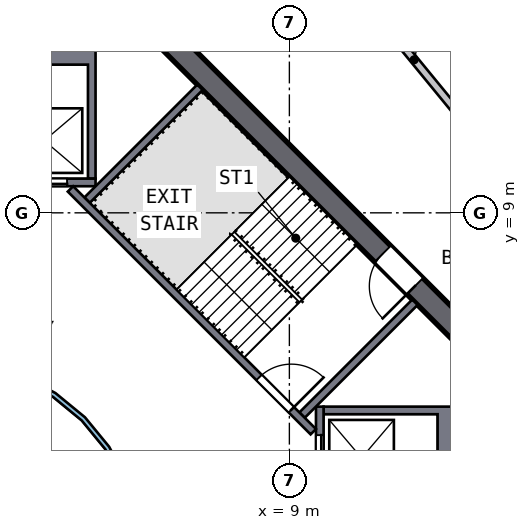
"""IFC4 building model, lengths in metres.
Left out: names, types, materials, properties, quantities, classifications, styles, units other than length and angle.
Written with IfcOpenShell. Run it as: python <this file> out.ifc"""

import sys

from ifc_helpers import new_model, si_unit, direction, frame, frame_2d, origin, place, context, subcontext, project, spatial, polyline, rectangle, outline, extrude, element, fill, save


model = new_model("IFC4")
c1 = context("Model", 3, precision=1e-05, world=origin(), true_north=direction((0.0, 1.0)))
c2 = subcontext(c1, "Body", "Model", "MODEL_VIEW")
j1 = project(units=[si_unit("LENGTHUNIT", "METRE"), si_unit("PLANEANGLEUNIT", "RADIAN")], contexts=[c1])
p1 = place(None, origin())
s1 = spatial("IfcSite", under=j1, at=p1, CompositionType="ELEMENT")
p2 = place(p1, origin())
s2 = spatial("IfcBuilding", under=s1, at=p2, CompositionType="ELEMENT")
p3 = place(p2, frame((0.0, 0.0, 194.0)))
s3 = spatial("IfcBuildingStorey", under=s2, at=p3, CompositionType="ELEMENT", Elevation=194.0)
p4 = place(p3, frame((13.788, 5.587, 0.0), z_axis=(0.0, 0.0, 1.0), x_axis=(-0.707106781, 0.707106781, 0.0)))
e1 = element("IfcWall", 1, at=p4, inside=s3, PredefinedType="SHEAR", context=c2, shape_type="SweptSolid", body=[
    extrude(rectangle(XDim=11.598, YDim=0.6, at=frame_2d((5.799, 0.0))), origin(), (0.0, 0.0, 1.0), 3.5),
])
p5 = place(p4, frame((2.099, 0.0, 0.0)))
e2 = element("IfcOpeningElement", 2, at=p5, cuts=e1, PredefinedType="OPENING", context=c2, shape_type="SweptSolid", body=[
    extrude(rectangle(XDim=1.2, YDim=2.1, at=frame_2d((0.6, 1.05))), frame((0.0, 0.31, 0.0), z_axis=(0.0, -1.0, 0.0), x_axis=(1.0, 0.0, 0.0)), (0.0, 0.0, 1.0), 0.62),
])
p6 = place(p3, origin())
e3 = element("IfcWall", 3, at=p6, inside=s3, PredefinedType="SOLIDWALL", context=c2, shape_type="SweptSolid", body=[
    extrude(outline(polyline([(13.4, 3.9), (13.4, 1.2), (9.9, 1.2), (9.9, 1.4), (12.9, 1.4), (12.9, 3.7), (9.9, 3.7), (9.9, 3.9), (13.4, 3.9)])), origin(), (0.0, 0.0, 1.0), 3.19),
])
p7 = place(p3, frame((9.8, 1.2, 0.0), z_axis=(0.0, 0.0, 1.0), x_axis=(0.0, 1.0, 0.0)))
e4 = element("IfcWall", 4, at=p7, inside=s3, PredefinedType="SOLIDWALL", context=c2, shape_type="SweptSolid", body=[
    extrude(rectangle(XDim=2.7, YDim=0.2, at=frame_2d((1.35, 0.0))), origin(), (0.0, 0.0, 1.0), 3.19),
])
p8 = place(p7, frame((0.75, 0.0, 0.0)))
e5 = element("IfcOpeningElement", 5, at=p8, cuts=e4, PredefinedType="OPENING", context=c2, shape_type="SweptSolid", body=[
    extrude(rectangle(XDim=1.2, YDim=2.1, at=frame_2d((0.6, 1.05))), frame((0.0, 0.11, 0.0), z_axis=(0.0, -1.0, 0.0), x_axis=(1.0, 0.0, 0.0)), (0.0, 0.0, 1.0), 0.22),
])
p9 = place(p3, origin())
e6 = element("IfcWall", 6, at=p9, inside=s3, PredefinedType="SOLIDWALL", context=c2, shape_type="SweptSolid", body=[
    extrude(outline(polyline([(3.9, 9.9), (3.7, 9.9), (3.7, 12.9), (1.4, 12.9), (1.4, 9.9), (1.2, 9.9), (1.2, 13.4), (3.9, 13.4), (3.9, 9.9)])), origin(), (0.0, 0.0, 1.0), 3.19),
])
p10 = place(p3, frame((1.2, 9.8, 0.0), z_axis=(0.0, 0.0, 1.0), x_axis=(1.0, 0.0, 0.0)))
e7 = element("IfcWall", 7, at=p10, inside=s3, PredefinedType="SOLIDWALL", context=c2, shape_type="SweptSolid", body=[
    extrude(rectangle(XDim=2.7, YDim=0.2, at=frame_2d((1.35, 0.0))), origin(), (0.0, 0.0, 1.0), 3.19),
])
p11 = place(p10, frame((0.75, 0.0, 0.0)))
e8 = element("IfcOpeningElement", 8, at=p11, cuts=e7, PredefinedType="OPENING", context=c2, shape_type="SweptSolid", body=[
    extrude(rectangle(XDim=1.2, YDim=2.1, at=frame_2d((0.6, 1.05))), frame((0.0, 0.11, 0.0), z_axis=(0.0, -1.0, 0.0), x_axis=(1.0, 0.0, 0.0)), (0.0, 0.0, 1.0), 0.22),
])
p12 = place(p3, frame((3.24, 9.629, 0.0), z_axis=(0.0, 0.0, 1.0), x_axis=(0.707106781, -0.707106781, 0.0)))
e9 = element("IfcWall", 9, at=p12, inside=s3, PredefinedType="SOLIDWALL", context=c2, shape_type="SweptSolid", body=[
    extrude(rectangle(XDim=9.036, YDim=0.2, at=frame_2d((4.518, 0.0))), origin(), (0.0, 0.0, 1.0), 3.19),
])
p13 = place(p12, frame((7.018, 0.0, 0.0)))
e10 = element("IfcOpeningElement", 10, at=p13, cuts=e9, PredefinedType="OPENING", context=c2, shape_type="SweptSolid", body=[
    extrude(rectangle(XDim=1.2, YDim=2.1, at=frame_2d((0.6, 1.05))), frame((0.0, 0.11, 0.0), z_axis=(0.0, -1.0, 0.0), x_axis=(1.0, 0.0, 0.0)), (0.0, 0.0, 1.0), 0.22),
])
for number, where, z_axis, x_axis in (
    (11, (9.334, 3.677, 0.0), (0.0, 0.0, 1.0), (0.707, 0.707, 0.0)),
    (12, (3.677, 9.334, 0.0), (0.0, 0.0, 1.0), (0.707, 0.707, 0.0)),
):
    element("IfcWall", number, at=place(p3, frame(where, z_axis=z_axis, x_axis=x_axis)), inside=s3, PredefinedType="SOLIDWALL", context=c2, shape_type="SweptSolid", body=[
        extrude(rectangle(XDim=4.2, YDim=0.2, at=frame_2d((2.1, 0.0))), origin(), (0.0, 0.0, 1.0), 3.19),
    ])
p14 = place(p3, origin())
e13 = element("IfcWall", 13, at=p14, inside=s3, PredefinedType="SOLIDWALL", context=c2, shape_type="SweptSolid", body=[
    extrude(outline(polyline([(5.021, -0.999), (4.73, -1.959), (4.257, -2.844), (3.62, -3.62), (2.844, -4.257), (1.959, -4.73), (0.999, -5.021), (0.0, -5.12), (-0.999, -5.021), (-1.959, -4.73), (-2.844, -4.257), (-3.62, -3.62), (-4.257, -2.844), (-4.73, -1.959), (-5.021, -0.999), (-5.12, 0.0), (-5.021, 0.999), (-4.73, 1.959), (-4.257, 2.844), (-3.62, 3.62), (-2.844, 4.257), (-1.959, 4.73), (-0.999, 5.021), (0.0, 5.12), (0.999, 5.021), (1.959, 4.73), (2.844, 4.257), (3.62, 3.62), (4.257, 2.844), (4.73, 1.959), (5.021, 0.999), (5.12, 0.0), (5.021, -0.999)]), holes=[polyline([(4.904, 0.976), (4.619, 1.913), (4.157, 2.778), (3.535, 3.535), (2.778, 4.157), (1.913, 4.619), (0.976, 4.904), (0.0, 5.0), (-0.976, 4.904), (-1.913, 4.619), (-2.778, 4.157), (-3.535, 3.535), (-4.157, 2.778), (-4.619, 1.913), (-4.904, 0.976), (-5.0, 0.0), (-4.904, -0.976), (-4.619, -1.913), (-4.157, -2.778), (-3.535, -3.535), (-2.778, -4.157), (-1.913, -4.619), (-0.976, -4.904), (0.0, -5.0), (0.976, -4.904), (1.913, -4.619), (2.778, -4.157), (3.535, -3.535), (4.157, -2.778), (4.619, -1.913), (4.904, -0.976), (5.0, 0.0), (4.904, 0.976)])]), origin(), (0.0, 0.0, 1.0), 3.19),
])
p15 = place(p3, frame((10.713, 14.941, 0.0), z_axis=(0.0, 0.0, 1.0), x_axis=(0.634184883, -0.773181437, 0.0)))
e14 = element("IfcWall", 14, at=p15, inside=s3, PredefinedType="SOLIDWALL", context=c2, shape_type="SweptSolid", body=[
    extrude(rectangle(XDim=9.316, YDim=0.2, at=frame_2d((4.658, 0.0))), origin(), (0.0, 0.0, 1.0), 3.19),
])
p16 = place(p15, frame((5.15, 0.0, 0.0)))
e15 = element("IfcOpeningElement", 15, at=p16, cuts=e14, PredefinedType="OPENING", context=c2, shape_type="SweptSolid", body=[
    extrude(rectangle(XDim=1.0, YDim=2.1, at=frame_2d((0.5, 1.05))), frame((0.0, 0.11, 0.0), z_axis=(0.0, -1.0, 0.0), x_axis=(1.0, 0.0, 0.0)), (0.0, 0.0, 1.0), 0.22),
])
p17 = place(p8, origin())
e16 = element("IfcDoor", 16, at=p17, inside=s3, OperationType="DOUBLE_DOOR_SLIDING", PredefinedType="DOOR", context=c2, shape_type="SweptSolid", body=[
    extrude(rectangle(XDim=1.2, YDim=2.1, at=frame_2d((0.6, 1.05))), frame((0.0, 0.025, 0.0), z_axis=(0.0, -1.0, 0.0), x_axis=(1.0, 0.0, 0.0)), (0.0, 0.0, 1.0), 0.05),
])
fill(e5, e16)
p18 = place(p11, origin())
e17 = element("IfcDoor", 17, at=p18, inside=s3, OperationType="DOUBLE_DOOR_SLIDING", PredefinedType="DOOR", context=c2, shape_type="SweptSolid", body=[
    extrude(rectangle(XDim=1.2, YDim=2.1, at=frame_2d((0.6, 1.05))), frame((0.0, 0.025, 0.0), z_axis=(0.0, -1.0, 0.0), x_axis=(1.0, 0.0, 0.0)), (0.0, 0.0, 1.0), 0.05),
])
fill(e8, e17)
p19 = place(p13, origin())
e18 = element("IfcDoor", 18, at=p19, inside=s3, OperationType="SINGLE_SWING_RIGHT", PredefinedType="DOOR", context=c2, shape_type="SweptSolid", body=[
    extrude(rectangle(XDim=1.2, YDim=2.1, at=frame_2d((0.6, 1.05))), frame((0.0, 0.025, 0.0), z_axis=(0.0, -1.0, 0.0), x_axis=(1.0, 0.0, 0.0)), (0.0, 0.0, 1.0), 0.05),
])
fill(e10, e18)
p20 = place(p5, origin())
e19 = element("IfcDoor", 19, at=p20, inside=s3, OperationType="SINGLE_SWING_LEFT", PredefinedType="DOOR", context=c2, shape_type="SweptSolid", body=[
    extrude(rectangle(XDim=1.2, YDim=2.1, at=frame_2d((0.6, 1.05))), frame((0.0, 0.025, 0.0), z_axis=(0.0, -1.0, 0.0), x_axis=(1.0, 0.0, 0.0)), (0.0, 0.0, 1.0), 0.05),
])
fill(e2, e19)
save(model, sys.argv[1])
